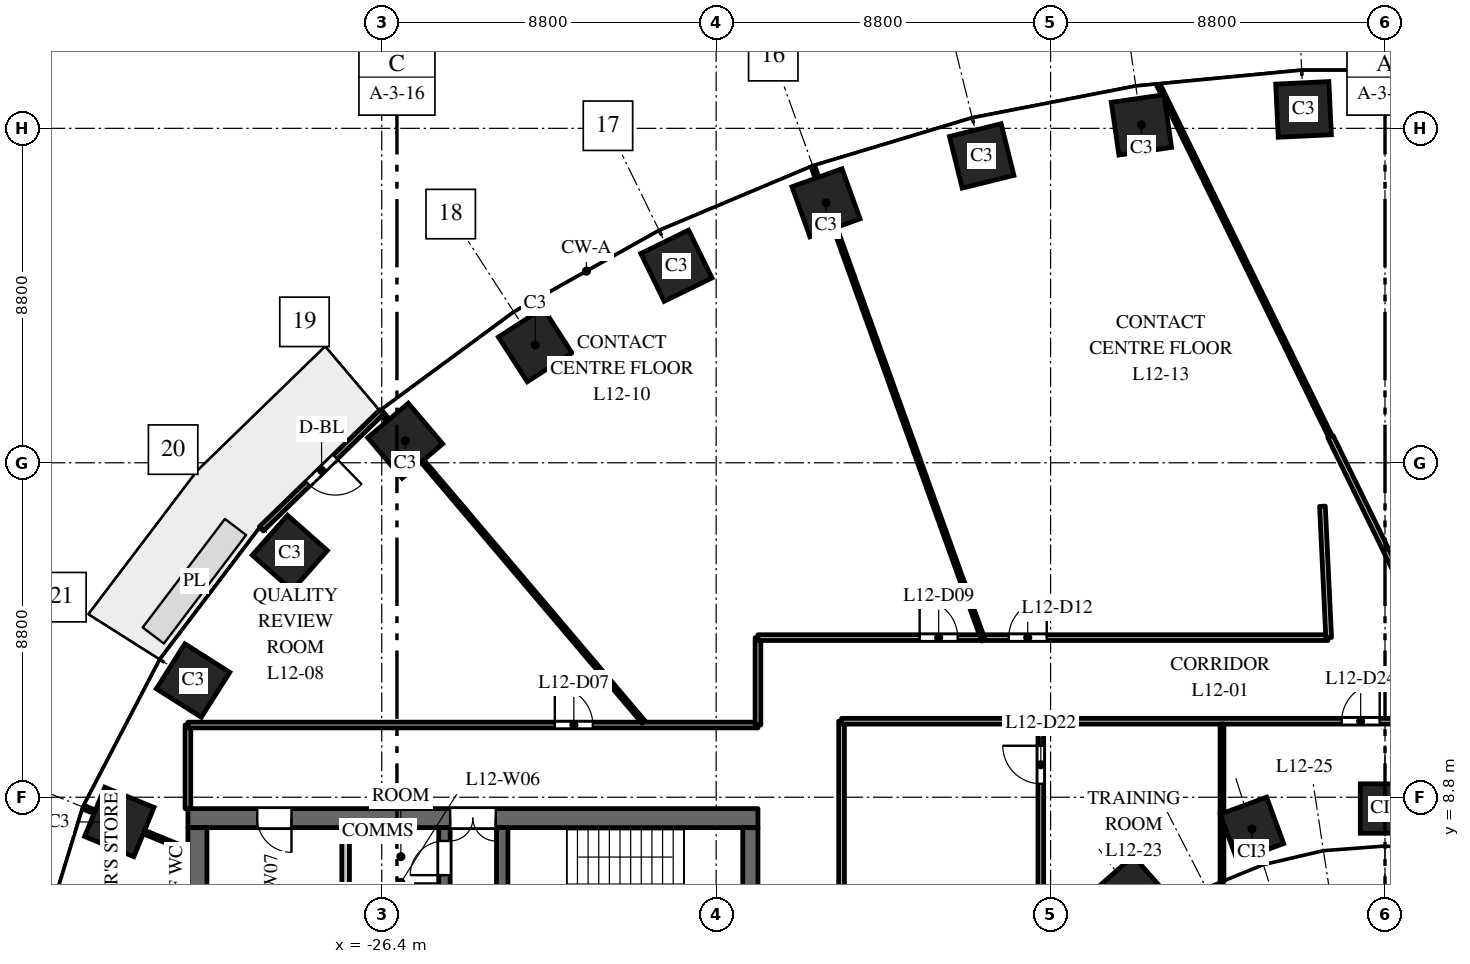
"""IFC4 building model, lengths in metres.
Left out: names, types, materials, properties, quantities, classifications, styles, units other than length and angle.
Written with IfcOpenShell. Run it as: python <this file> out.ifc"""

import sys

from ifc_helpers import new_model, si_unit, direction, frame, frame_2d, origin, origin_2d, place, context, subcontext, project, spatial, rectangle, extrude, element, fill, save


model = new_model("IFC4")
c1 = context("Model", 3, precision=1e-05, world=origin(), true_north=direction((0.0, 1.0)))
c2 = subcontext(c1, "Body", "Model", "MODEL_VIEW")
j1 = project(units=[si_unit("LENGTHUNIT", "METRE"), si_unit("PLANEANGLEUNIT", "RADIAN")], contexts=[c1])
p1 = place(None, origin())
s1 = spatial("IfcSite", under=j1, at=p1, CompositionType="ELEMENT")
p2 = place(p1, origin())
s2 = spatial("IfcBuilding", under=s1, at=p2, CompositionType="ELEMENT")
p3 = place(p2, frame((0.0, 0.0, 58.5)))
s3 = spatial("IfcBuildingStorey", under=s2, at=p3, CompositionType="ELEMENT", Elevation=58.5)
for number, where, z_axis, x_axis in (
    (1, (-2.143, 26.898, 0.0), (0.0, 0.0, 1.0), (-0.999, -0.048, 0.0)),
    (2, (-6.409, 26.491, 0.0), (0.0, 0.0, 1.0), (-0.99, -0.143, 0.0)),
    (3, (-10.613, 25.674, 0.0), (0.0, 0.0, 1.0), (-0.971, -0.24, 0.0)),
    (4, (-14.709, 24.441, 0.0), (0.0, 0.0, 1.0), (-0.941, -0.338, 0.0)),
    (5, (-18.646, 22.785, 0.0), (0.0, 0.0, 1.0), (-0.898, -0.439, 0.0)),
    (6, (-22.362, 20.7, 0.0), (0.0, 0.0, 1.0), (-0.84, -0.542, 0.0)),
    (7, (-25.783, 18.18, 0.0), (0.0, 0.0, 1.0), (-0.763, -0.646, 0.0)),
    (8, (-28.819, 15.23, 0.0), (0.0, 0.0, 1.0), (-0.663, -0.749, 0.0)),
    (9, (-31.365, 11.871, 0.0), (0.0, 0.0, 1.0), (-0.535, -0.845, 0.0)),
    (10, (-33.305, 8.149, 0.0), (0.0, 0.0, 1.0), (-0.379, -0.925, 0.0)),
):
    element("IfcColumn", number, at=place(p3, frame(where, z_axis=z_axis, x_axis=x_axis)), inside=s3, PredefinedType="COLUMN", context=c2, shape_type="SweptSolid", body=[
        extrude(rectangle(XDim=1.4, YDim=1.4, at=origin_2d()), origin(), (0.0, 0.0, 1.0), 4.0),
    ])
for number, where, z_axis, x_axis in (
    (11, (0.0, 8.503, 0.0), (0.0, 0.0, 1.0), (-1.0, 0.0, 0.0)),
    (12, (-3.501, 7.967, 0.0), (0.0, 0.0, 1.0), (-0.939, -0.344, 0.0)),
    (13, (-6.682, 6.334, 0.0), (0.0, 0.0, 1.0), (-0.751, -0.66, 0.0)),
):
    element("IfcColumn", number, at=place(p3, frame(where, z_axis=z_axis, x_axis=x_axis)), inside=s3, PredefinedType="COLUMN", context=c2, shape_type="SweptSolid", body=[
        extrude(rectangle(XDim=1.3, YDim=1.3, at=origin_2d()), origin(), (0.0, 0.0, 1.0), 4.0),
    ])
p4 = place(p3, frame((-16.5, 8.25, 0.0), z_axis=(0.0, 0.0, 1.0), x_axis=(-1.0, 0.0, 0.0)))
e14 = element("IfcWall", 14, at=p4, inside=s3, PredefinedType="SHEAR", context=c2, shape_type="SweptSolid", body=[
    extrude(rectangle(XDim=15.0, YDim=0.5, at=frame_2d((7.5, 0.0))), origin(), (0.0, 0.0, 1.0), 3.7),
])
p5 = place(p4, frame((6.9, 0.0, 0.0)))
e15 = element("IfcOpeningElement", 15, at=p5, cuts=e14, PredefinedType="OPENING", context=c2, shape_type="SweptSolid", body=[
    extrude(rectangle(XDim=1.2, YDim=2.1, at=frame_2d((0.6, 1.05))), frame((0.0, 0.26, 0.0), z_axis=(0.0, -1.0, 0.0), x_axis=(1.0, 0.0, 0.0)), (0.0, 0.0, 1.0), 0.52),
])
p6 = place(p4, frame((12.275, 0.0, 0.0)))
e16 = element("IfcOpeningElement", 16, at=p6, cuts=e14, PredefinedType="OPENING", context=c2, shape_type="SweptSolid", body=[
    extrude(rectangle(XDim=0.9, YDim=2.1, at=frame_2d((0.45, 1.05))), frame((0.0, 0.26, 0.0), z_axis=(0.0, -1.0, 0.0), x_axis=(1.0, 0.0, 0.0)), (0.0, 0.0, 1.0), 0.52),
])
p7 = place(p3, frame((-24.75, -8.0, 0.0), z_axis=(0.0, 0.0, 1.0), x_axis=(0.0, 1.0, 0.0)))
e17 = element("IfcWall", 17, at=p7, inside=s3, PredefinedType="SHEAR", context=c2, shape_type="SweptSolid", body=[
    extrude(rectangle(XDim=16.0, YDim=0.3, at=frame_2d((8.0, 0.0))), origin(), (0.0, 0.0, 1.0), 3.7),
])
p8 = place(p7, frame((4.425, 0.0, 0.0)))
e18 = element("IfcOpeningElement", 18, at=p8, cuts=e17, PredefinedType="OPENING", context=c2, shape_type="SweptSolid", body=[
    extrude(rectangle(XDim=1.1, YDim=2.1, at=frame_2d((0.55, 1.05))), frame((0.0, 0.16, 0.0), z_axis=(0.0, -1.0, 0.0), x_axis=(1.0, 0.0, 0.0)), (0.0, 0.0, 1.0), 0.32),
])
p9 = place(p7, frame((7.45, 0.0, 0.0)))
e19 = element("IfcOpeningElement", 19, at=p9, cuts=e17, PredefinedType="OPENING", context=c2, shape_type="SweptSolid", body=[
    extrude(rectangle(XDim=1.1, YDim=2.1, at=frame_2d((0.55, 1.05))), frame((0.0, 0.16, 0.0), z_axis=(0.0, -1.0, 0.0), x_axis=(1.0, 0.0, 0.0)), (0.0, 0.0, 1.0), 0.32),
])
p10 = place(p7, frame((10.425, 0.0, 0.0)))
e20 = element("IfcOpeningElement", 20, at=p10, cuts=e17, PredefinedType="OPENING", context=c2, shape_type="SweptSolid", body=[
    extrude(rectangle(XDim=1.2, YDim=2.1, at=frame_2d((0.6, 1.05))), frame((0.0, 0.16, 0.0), z_axis=(0.0, -1.0, 0.0), x_axis=(1.0, 0.0, 0.0)), (0.0, 0.0, 1.0), 0.32),
])
p11 = place(p7, frame((13.125, 0.0, 0.0)))
e21 = element("IfcOpeningElement", 21, at=p11, cuts=e17, PredefinedType="OPENING", context=c2, shape_type="SweptSolid", body=[
    extrude(rectangle(XDim=0.9, YDim=2.1, at=frame_2d((0.45, 1.05))), frame((0.0, 0.16, 0.0), z_axis=(0.0, -1.0, 0.0), x_axis=(1.0, 0.0, 0.0)), (0.0, 0.0, 1.0), 0.32),
])
p12 = place(p7, frame((14.75, 0.0, 0.0)))
e22 = element("IfcOpeningElement", 22, at=p12, cuts=e17, PredefinedType="OPENING", context=c2, shape_type="SweptSolid", body=[
    extrude(rectangle(XDim=0.9, YDim=2.1, at=frame_2d((0.45, 1.05))), frame((0.0, 0.16, 0.0), z_axis=(0.0, -1.0, 0.0), x_axis=(1.0, 0.0, 0.0)), (0.0, 0.0, 1.0), 0.32),
])
p13 = place(p7, frame((1.35, 0.0, 0.0)))
e23 = element("IfcOpeningElement", 23, at=p13, cuts=e17, PredefinedType="OPENING", context=c2, shape_type="SweptSolid", body=[
    extrude(rectangle(XDim=0.9, YDim=2.1, at=frame_2d((0.45, 1.05))), frame((0.0, 0.16, 0.0), z_axis=(0.0, -1.0, 0.0), x_axis=(1.0, 0.0, 0.0)), (0.0, 0.0, 1.0), 0.32),
])
p14 = place(p3, frame((-16.7, -8.0, 0.0), z_axis=(0.0, 0.0, 1.0), x_axis=(0.0, 1.0, 0.0)))
e24 = element("IfcWall", 24, at=p14, inside=s3, PredefinedType="SHEAR", context=c2, shape_type="SweptSolid", body=[
    extrude(rectangle(XDim=16.0, YDim=0.4, at=frame_2d((8.0, 0.0))), origin(), (0.0, 0.0, 1.0), 3.7),
])
p15 = place(p3, frame((-31.25, -8.0, 0.0), z_axis=(0.0, 0.0, 1.0), x_axis=(0.0, 1.0, 0.0)))
e25 = element("IfcWall", 25, at=p15, inside=s3, PredefinedType="SHEAR", context=c2, shape_type="SweptSolid", body=[
    extrude(rectangle(XDim=16.0, YDim=0.5, at=frame_2d((8.0, 0.0))), origin(), (0.0, 0.0, 1.0), 3.7),
])
p16 = place(p3, frame((-27.35, 4.75, 0.0), z_axis=(0.0, 0.0, 1.0), x_axis=(0.0, 1.0, 0.0)))
e26 = element("IfcWall", 26, at=p16, inside=s3, PredefinedType="PARTITIONING", context=c2, shape_type="SweptSolid", body=[
    extrude(rectangle(XDim=3.25, YDim=0.2, at=frame_2d((1.625, 0.0))), origin(), (0.0, 0.0, 1.0), 3.7),
])
p17 = place(p3, frame((-23.23, 2.25, 0.0), z_axis=(0.0, 0.0, 1.0), x_axis=(0.0, 1.0, 0.0)))
e27 = element("IfcWall", 27, at=p17, inside=s3, PredefinedType="SHEAR", context=c2, shape_type="SweptSolid", body=[
    extrude(rectangle(XDim=5.75, YDim=0.3, at=frame_2d((2.875, 0.0))), origin(), (0.0, 0.0, 1.0), 3.7),
])
p18 = place(p17, frame((0.6, 0.0, 0.0)))
e28 = element("IfcOpeningElement", 28, at=p18, cuts=e27, PredefinedType="OPENING", context=c2, shape_type="SweptSolid", body=[
    extrude(rectangle(XDim=1.0, YDim=2.1, at=frame_2d((0.5, 1.05))), frame((0.0, 0.16, 0.0), z_axis=(0.0, -1.0, 0.0), x_axis=(1.0, 0.0, 0.0)), (0.0, 0.0, 1.0), 0.32),
])
p19 = place(p3, frame((-26.396, 18.943, 0.0), z_axis=(0.0, 0.0, 1.0), x_axis=(-0.717214761864, -0.696852197647, 0.0)))
e29 = element("IfcWall", 29, at=p19, inside=s3, PredefinedType="STANDARD", context=c2, shape_type="SweptSolid", body=[
    extrude(rectangle(XDim=4.424, YDim=0.15, at=frame_2d((2.212, 0.0))), origin(), (0.0, 0.0, 1.0), 3.7),
])
p20 = place(p19, frame((1.712, 0.0, 0.0)))
e30 = element("IfcOpeningElement", 30, at=p20, cuts=e29, PredefinedType="OPENING", context=c2, shape_type="SweptSolid", body=[
    extrude(rectangle(XDim=1.0, YDim=2.4, at=frame_2d((0.5, 1.2))), frame((0.0, 0.085, 0.0), z_axis=(0.0, -1.0, 0.0), x_axis=(1.0, 0.0, 0.0)), (0.0, 0.0, 1.0), 0.17),
])
p21 = place(p3, frame((-34.234, 8.53, 0.0), z_axis=(0.0, 0.0, 1.0), x_axis=(0.925344112436, -0.379128307542, 0.0)))
e31 = element("IfcWall", 31, at=p21, inside=s3, PredefinedType="PARTITIONING", context=c2, shape_type="SweptSolid", body=[
    extrude(rectangle(XDim=2.954, YDim=0.1, at=frame_2d((1.477, 0.0))), origin(), (0.0, 0.0, 1.0), 2.85),
])
p22 = place(p3, frame((-31.5, 8.5, 0.0), z_axis=(0.0, 0.0, 1.0), x_axis=(0.0, 1.0, 0.0)))
e32 = element("IfcWall", 32, at=p22, inside=s3, PredefinedType="PARTITIONING", context=c2, shape_type="SweptSolid", body=[
    extrude(rectangle(XDim=2.2, YDim=0.15, at=frame_2d((1.1, 0.0))), origin(), (0.0, 0.0, 1.0), 3.7),
])
p23 = place(p3, frame((-31.5, 10.7, 0.0), z_axis=(0.0, 0.0, 1.0), x_axis=(1.0, 0.0, 0.0)))
e33 = element("IfcWall", 33, at=p23, inside=s3, PredefinedType="PARTITIONING", context=c2, shape_type="SweptSolid", body=[
    extrude(rectangle(XDim=15.0, YDim=0.15, at=frame_2d((7.5, 0.0))), origin(), (0.0, 0.0, 1.0), 3.1),
])
p24 = place(p23, frame((9.655, 0.0, 0.0)))
e34 = element("IfcOpeningElement", 34, at=p24, cuts=e33, PredefinedType="OPENING", context=c2, shape_type="SweptSolid", body=[
    extrude(rectangle(XDim=1.0, YDim=2.1, at=frame_2d((0.5, 1.05))), frame((0.0, 0.085, 0.0), z_axis=(0.0, -1.0, 0.0), x_axis=(1.0, 0.0, 0.0)), (0.0, 0.0, 1.0), 0.17),
])
p25 = place(p3, frame((-26.43, 18.945, 0.0), z_axis=(0.0, 0.0, 1.0), x_axis=(0.646400187952, -0.762998556365, 0.0)))
e35 = element("IfcWall", 35, at=p25, inside=s3, PredefinedType="PARTITIONING", context=c2, shape_type="SweptSolid", body=[
    extrude(rectangle(XDim=10.704, YDim=0.1, at=frame_2d((5.352, 0.0))), origin(), (0.0, 0.0, 1.0), 3.7),
])
p26 = place(p3, frame((-16.5, 10.7, 0.0), z_axis=(0.0, 0.0, 1.0), x_axis=(0.0, 1.0, 0.0)))
e36 = element("IfcWall", 36, at=p26, inside=s3, PredefinedType="PARTITIONING", context=c2, shape_type="SweptSolid", body=[
    extrude(rectangle(XDim=2.3, YDim=0.15, at=frame_2d((1.15, 0.0))), origin(), (0.0, 0.0, 1.0), 2.75),
])
p27 = place(p3, frame((-16.5, 13.0, 0.0), z_axis=(0.0, 0.0, 1.0), x_axis=(1.0, 0.0, 0.0)))
e37 = element("IfcWall", 37, at=p27, inside=s3, PredefinedType="PARTITIONING", context=c2, shape_type="SweptSolid", body=[
    extrude(rectangle(XDim=5.893, YDim=0.15, at=frame_2d((2.947, 0.0))), origin(), (0.0, 0.0, 1.0), 2.85),
])
p28 = place(p27, frame((4.255, 0.0, 0.0)))
e38 = element("IfcOpeningElement", 38, at=p28, cuts=e37, PredefinedType="OPENING", context=c2, shape_type="SweptSolid", body=[
    extrude(rectangle(XDim=1.0, YDim=2.1, at=frame_2d((0.5, 1.05))), frame((0.0, 0.085, 0.0), z_axis=(0.0, -1.0, 0.0), x_axis=(1.0, 0.0, 0.0)), (0.0, 0.0, 1.0), 0.17),
])
p29 = place(p3, frame((-15.048, 25.383, 0.0), z_axis=(0.0, 0.0, 1.0), x_axis=(0.338391637428, -0.941005366467, 0.0)))
e39 = element("IfcWall", 39, at=p29, inside=s3, PredefinedType="PARTITIONING", context=c2, shape_type="SweptSolid", body=[
    extrude(rectangle(XDim=13.239, YDim=0.1, at=frame_2d((6.62, 0.0))), origin(), (0.0, 0.0, 1.0), 2.85),
])
p30 = place(p3, frame((-14.3, -10.8, 0.0), z_axis=(0.0, 0.0, 1.0), x_axis=(0.0, 1.0, 0.0)))
e40 = element("IfcWall", 40, at=p30, inside=s3, PredefinedType="PARTITIONING", context=c2, shape_type="SweptSolid", body=[
    extrude(rectangle(XDim=21.6, YDim=0.15, at=frame_2d((10.8, 0.0))), origin(), (0.0, 0.0, 1.0), 2.75),
])
p31 = place(p30, frame((0.65, 0.0, 0.0)))
e41 = element("IfcOpeningElement", 41, at=p31, cuts=e40, PredefinedType="OPENING", context=c2, shape_type="SweptSolid", body=[
    extrude(rectangle(XDim=1.0, YDim=2.1, at=frame_2d((0.5, 1.05))), frame((0.0, 0.085, 0.0), z_axis=(0.0, -1.0, 0.0), x_axis=(1.0, 0.0, 0.0)), (0.0, 0.0, 1.0), 0.17),
])
p32 = place(p3, frame((-14.3, 10.8, 0.0), z_axis=(0.0, 0.0, 1.0), x_axis=(1.0, 0.0, 0.0)))
e42 = element("IfcWall", 42, at=p32, inside=s3, PredefinedType="PARTITIONING", context=c2, shape_type="SweptSolid", body=[
    extrude(rectangle(XDim=28.6, YDim=0.15, at=frame_2d((14.3, 0.0))), origin(), (0.0, 0.0, 1.0), 2.85),
])
p33 = place(p32, frame((13.16, 0.0, 0.0)))
e43 = element("IfcOpeningElement", 43, at=p33, cuts=e42, PredefinedType="OPENING", context=c2, shape_type="SweptSolid", body=[
    extrude(rectangle(XDim=1.0, YDim=2.1, at=frame_2d((0.5, 1.05))), frame((0.0, 0.085, 0.0), z_axis=(0.0, -1.0, 0.0), x_axis=(1.0, 0.0, 0.0)), (0.0, 0.0, 1.0), 0.17),
])
p34 = place(p32, frame((17.927, 0.0, 0.0)))
e44 = element("IfcOpeningElement", 44, at=p34, cuts=e42, PredefinedType="OPENING", context=c2, shape_type="SweptSolid", body=[
    extrude(rectangle(XDim=1.0, YDim=2.1, at=frame_2d((0.5, 1.05))), frame((0.0, 0.085, 0.0), z_axis=(0.0, -1.0, 0.0), x_axis=(1.0, 0.0, 0.0)), (0.0, 0.0, 1.0), 0.17),
])
p35 = place(p32, frame((20.193, 0.0, 0.0)))
e45 = element("IfcOpeningElement", 45, at=p35, cuts=e42, PredefinedType="OPENING", context=c2, shape_type="SweptSolid", body=[
    extrude(rectangle(XDim=1.0, YDim=2.1, at=frame_2d((0.5, 1.05))), frame((0.0, 0.085, 0.0), z_axis=(0.0, -1.0, 0.0), x_axis=(1.0, 0.0, 0.0)), (0.0, 0.0, 1.0), 0.17),
])
p36 = place(p3, frame((-10.542, 13.0, 0.0), z_axis=(0.0, 0.0, 1.0), x_axis=(1.0, 0.0, 0.0)))
e46 = element("IfcWall", 46, at=p36, inside=s3, PredefinedType="PARTITIONING", context=c2, shape_type="SweptSolid", body=[
    extrude(rectangle(XDim=9.041, YDim=0.15, at=frame_2d((4.521, 0.0))), origin(), (0.0, 0.0, 1.0), 2.85),
])
p37 = place(p36, frame((0.641, 0.0, 0.0)))
e47 = element("IfcOpeningElement", 47, at=p37, cuts=e46, PredefinedType="OPENING", context=c2, shape_type="SweptSolid", body=[
    extrude(rectangle(XDim=1.0, YDim=2.1, at=frame_2d((0.5, 1.05))), frame((0.0, 0.085, 0.0), z_axis=(0.0, -1.0, 0.0), x_axis=(1.0, 0.0, 0.0)), (0.0, 0.0, 1.0), 0.17),
])
p38 = place(p3, frame((-9.057, 0.045, 0.0), z_axis=(0.0, 0.0, 1.0), x_axis=(0.0, 1.0, 0.0)))
e48 = element("IfcWall", 48, at=p38, inside=s3, PredefinedType="PARTITIONING", context=c2, shape_type="SweptSolid", body=[
    extrude(rectangle(XDim=10.68, YDim=0.15, at=frame_2d((5.34, 0.0))), origin(), (0.0, 0.0, 1.0), 2.75),
])
p39 = place(p38, frame((9.11, 0.0, 0.0)))
e49 = element("IfcOpeningElement", 49, at=p39, cuts=e48, PredefinedType="OPENING", context=c2, shape_type="SweptSolid", body=[
    extrude(rectangle(XDim=1.0, YDim=2.1, at=frame_2d((0.5, 1.05))), frame((0.0, 0.085, 0.0), z_axis=(0.0, -1.0, 0.0), x_axis=(1.0, 0.0, 0.0)), (0.0, 0.0, 1.0), 0.17),
])
p40 = place(p3, frame((-5.958, 27.538, 0.0), z_axis=(0.0, 0.0, 1.0), x_axis=(0.439258205704, -0.898360856628, 0.0)))
e50 = element("IfcWall", 50, at=p40, inside=s3, PredefinedType="PARTITIONING", context=c2, shape_type="SweptSolid", body=[
    extrude(rectangle(XDim=10.384, YDim=0.1, at=frame_2d((5.192, 0.0))), origin(), (0.0, 0.0, 1.0), 2.85),
])
p41 = place(p3, frame((-4.29, 6.568, 0.0), z_axis=(0.0, 0.0, 1.0), x_axis=(0.0, 1.0, 0.0)))
e51 = element("IfcWall", 51, at=p41, inside=s3, PredefinedType="PARTITIONING", context=c2, shape_type="SweptSolid", body=[
    extrude(rectangle(XDim=4.157, YDim=0.1, at=frame_2d((2.079, 0.0))), origin(), (0.0, 0.0, 1.0), 2.85),
])
p42 = place(p3, frame((-1.646, 16.456, 0.0), z_axis=(0.0, 0.0, 1.0), x_axis=(0.047417639272, -0.9988751511, 0.0)))
e52 = element("IfcWall", 52, at=p42, inside=s3, PredefinedType="PARTITIONING", context=c2, shape_type="SweptSolid", body=[
    extrude(rectangle(XDim=3.46, YDim=0.15, at=frame_2d((1.73, 0.0))), origin(), (0.0, 0.0, 1.0), 3.7),
])
p43 = place(p3, frame((-1.437, 18.29, 0.0), z_axis=(0.0, 0.0, 1.0), x_axis=(0.439496028197, -0.898244533075, 0.0)))
e53 = element("IfcWall", 53, at=p43, inside=s3, PredefinedType="PARTITIONING", context=c2, shape_type="SweptSolid", body=[
    extrude(rectangle(XDim=5.973, YDim=0.15, at=frame_2d((2.986, 0.0))), origin(), (0.0, 0.0, 1.0), 2.85),
])
p44 = place(p5, origin())
e54 = element("IfcDoor", 54, at=p44, inside=s3, OperationType="DOUBLE_DOOR_DOUBLE_SWING", PredefinedType="DOOR", context=c2, shape_type="SweptSolid", body=[
    extrude(rectangle(XDim=1.2, YDim=2.1, at=frame_2d((0.6, 1.05))), frame((0.0, 0.025, 0.0), z_axis=(0.0, -1.0, 0.0), x_axis=(1.0, 0.0, 0.0)), (0.0, 0.0, 1.0), 0.05),
])
fill(e15, e54)
p45 = place(p12, origin())
e55 = element("IfcDoor", 55, at=p45, inside=s3, OperationType="SINGLE_SWING_RIGHT", PredefinedType="DOOR", context=c2, shape_type="SweptSolid", body=[
    extrude(rectangle(XDim=0.9, YDim=2.1, at=frame_2d((0.45, 1.05))), frame((0.0, 0.025, 0.0), z_axis=(0.0, -1.0, 0.0), x_axis=(1.0, 0.0, 0.0)), (0.0, 0.0, 1.0), 0.05),
])
fill(e22, e55)
p46 = place(p6, origin())
e56 = element("IfcDoor", 56, at=p46, inside=s3, OperationType="SINGLE_SWING_RIGHT", PredefinedType="DOOR", context=c2, shape_type="SweptSolid", body=[
    extrude(rectangle(XDim=0.9, YDim=2.1, at=frame_2d((0.45, 1.05))), frame((0.0, 0.025, 0.0), z_axis=(0.0, -1.0, 0.0), x_axis=(1.0, 0.0, 0.0)), (0.0, 0.0, 1.0), 0.05),
])
fill(e16, e56)
p47 = place(p20, origin())
e57 = element("IfcDoor", 57, at=p47, inside=s3, OperationType="SINGLE_SWING_LEFT", PredefinedType="DOOR", context=c2, shape_type="SweptSolid", body=[
    extrude(rectangle(XDim=1.0, YDim=2.4, at=frame_2d((0.5, 1.2))), frame((0.0, 0.025, 0.0), z_axis=(0.0, -1.0, 0.0), x_axis=(1.0, 0.0, 0.0)), (0.0, 0.0, 1.0), 0.05),
])
fill(e30, e57)
p48 = place(p24, origin())
e58 = element("IfcDoor", 58, at=p48, inside=s3, OperationType="SINGLE_SWING_LEFT", PredefinedType="DOOR", context=c2, shape_type="SweptSolid", body=[
    extrude(rectangle(XDim=1.0, YDim=2.1, at=frame_2d((0.5, 1.05))), frame((0.0, 0.025, 0.0), z_axis=(0.0, -1.0, 0.0), x_axis=(1.0, 0.0, 0.0)), (0.0, 0.0, 1.0), 0.05),
])
fill(e34, e58)
p49 = place(p28, origin())
e59 = element("IfcDoor", 59, at=p49, inside=s3, OperationType="SINGLE_SWING_LEFT", PredefinedType="DOOR", context=c2, shape_type="SweptSolid", body=[
    extrude(rectangle(XDim=1.0, YDim=2.1, at=frame_2d((0.5, 1.05))), frame((0.0, 0.025, 0.0), z_axis=(0.0, -1.0, 0.0), x_axis=(1.0, 0.0, 0.0)), (0.0, 0.0, 1.0), 0.05),
])
fill(e38, e59)
p50 = place(p37, origin())
e60 = element("IfcDoor", 60, at=p50, inside=s3, OperationType="SINGLE_SWING_RIGHT", PredefinedType="DOOR", context=c2, shape_type="SweptSolid", body=[
    extrude(rectangle(XDim=1.0, YDim=2.1, at=frame_2d((0.5, 1.05))), frame((0.0, 0.025, 0.0), z_axis=(0.0, -1.0, 0.0), x_axis=(1.0, 0.0, 0.0)), (0.0, 0.0, 1.0), 0.05),
])
fill(e47, e60)
p51 = place(p39, origin())
e61 = element("IfcDoor", 61, at=p51, inside=s3, OperationType="SINGLE_SWING_RIGHT", PredefinedType="DOOR", context=c2, shape_type="SweptSolid", body=[
    extrude(rectangle(XDim=1.0, YDim=2.1, at=frame_2d((0.5, 1.05))), frame((0.0, 0.025, 0.0), z_axis=(0.0, -1.0, 0.0), x_axis=(1.0, 0.0, 0.0)), (0.0, 0.0, 1.0), 0.05),
])
fill(e49, e61)
p52 = place(p33, origin())
e62 = element("IfcDoor", 62, at=p52, inside=s3, OperationType="SINGLE_SWING_RIGHT", PredefinedType="DOOR", context=c2, shape_type="SweptSolid", body=[
    extrude(rectangle(XDim=1.0, YDim=2.1, at=frame_2d((0.5, 1.05))), frame((0.0, 0.025, 0.0), z_axis=(0.0, -1.0, 0.0), x_axis=(1.0, 0.0, 0.0)), (0.0, 0.0, 1.0), 0.05),
])
fill(e43, e62)
save(model, sys.argv[1])
